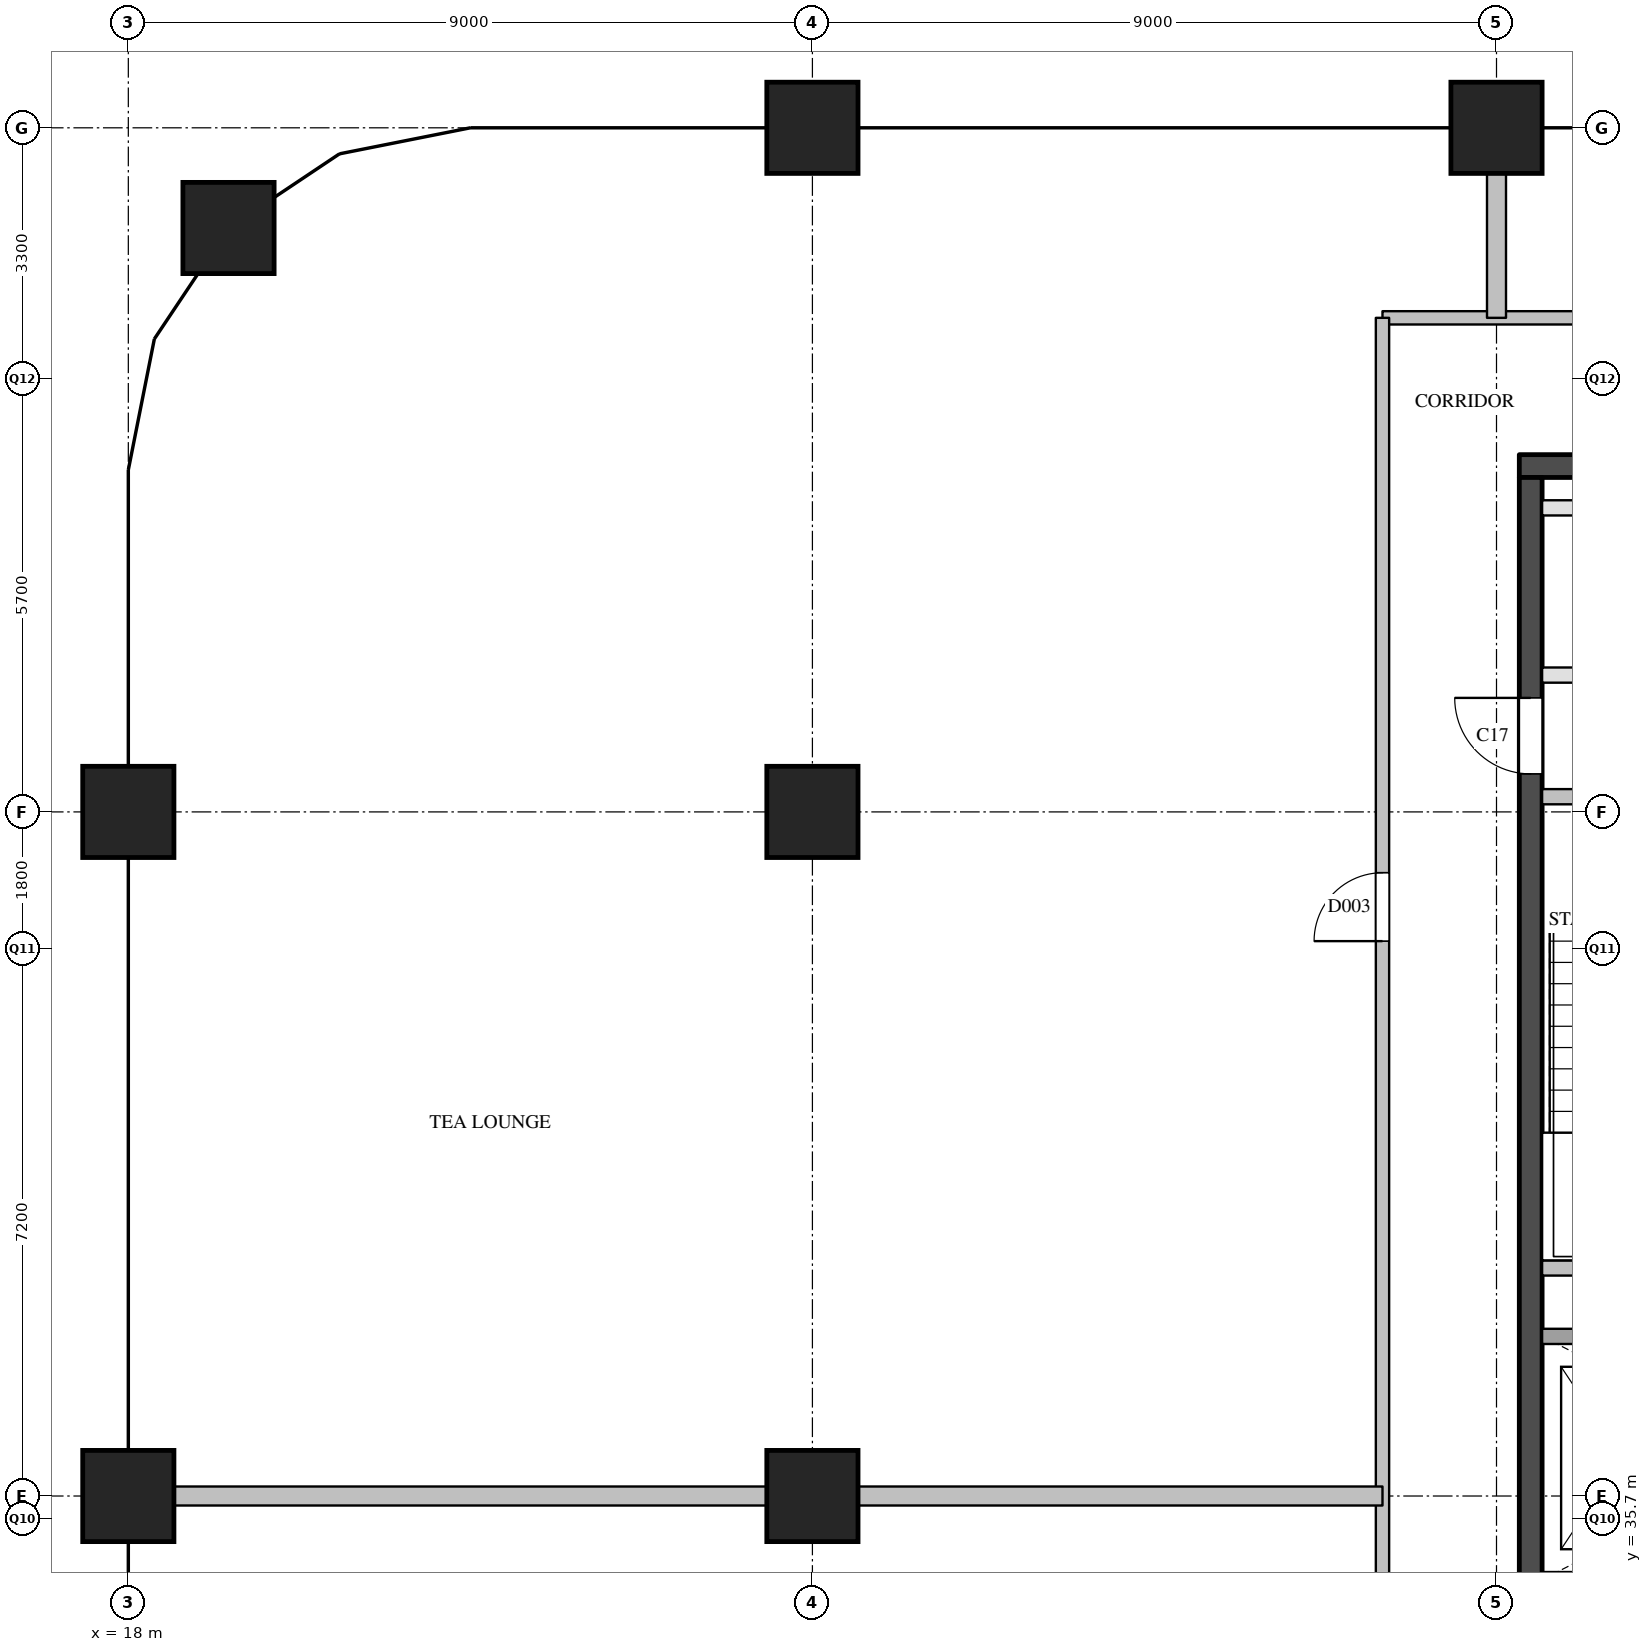
"""IFC4 building model, lengths in metres.
Left out: names, types, materials, properties, quantities, classifications, styles, units other than length and angle.
Written with IfcOpenShell. Run it as: python <this file> out.ifc"""

import sys

from ifc_helpers import new_model, si_unit, direction, frame, frame_2d, origin, origin_2d, place, context, subcontext, project, spatial, rectangle, extrude, element, fill, save


model = new_model("IFC4")
c1 = context("Model", 3, precision=1e-05, world=origin(), true_north=direction((0.0, 1.0)))
c2 = subcontext(c1, "Body", "Model", "MODEL_VIEW")
j1 = project(units=[si_unit("LENGTHUNIT", "METRE"), si_unit("PLANEANGLEUNIT", "RADIAN")], contexts=[c1])
p1 = place(None, origin())
s1 = spatial("IfcSite", under=j1, at=p1, CompositionType="ELEMENT")
p2 = place(p1, origin())
s2 = spatial("IfcBuilding", under=s1, at=p2, CompositionType="ELEMENT")
p3 = place(p2, frame((0.0, 0.0, 305.1)))
s3 = spatial("IfcBuildingStorey", under=s2, at=p3, CompositionType="ELEMENT", Elevation=305.1)
for number, where, z_axis, x_axis in (
    (1, (18.0, 36.0, 0.0), (0.0, 0.0, 1.0), (1.0, 0.0, 0.0)),
    (2, (18.0, 45.0, 0.0), (0.0, 0.0, 1.0), (1.0, 0.0, 0.0)),
    (3, (19.318, 52.682, 0.0), (0.0, 0.0, 1.0), (1.0, 0.0, 0.0)),
    (4, (27.0, 36.0, 0.0), (0.0, 0.0, 1.0), (1.0, 0.0, 0.0)),
    (5, (27.0, 45.0, 0.0), (0.0, 0.0, 1.0), (1.0, 0.0, 0.0)),
    (6, (27.0, 54.0, 0.0), (0.0, 0.0, 1.0), (1.0, 0.0, 0.0)),
    (7, (36.0, 54.0, 0.0), (0.0, 0.0, 1.0), (1.0, 0.0, 0.0)),
):
    element("IfcColumn", number, at=place(p3, frame(where, z_axis=z_axis, x_axis=x_axis)), inside=s3, PredefinedType="COLUMN", context=c2, shape_type="SweptSolid", body=[
        extrude(rectangle(XDim=1.2, YDim=1.2, at=origin_2d()), origin(), (0.0, 0.0, 1.0), 3.9),
    ])
p4 = place(p3, frame((36.3, 49.55, 0.0), z_axis=(0.0, 0.0, 1.0), x_axis=(1.0, 0.0, 0.0)))
e8 = element("IfcWall", 8, at=p4, inside=s3, PredefinedType="SHEAR", context=c2, shape_type="SweptSolid", body=[
    extrude(rectangle(XDim=11.8, YDim=0.3, at=frame_2d((5.9, 0.0))), origin(), (0.0, 0.0, 1.0), 3.6),
])
p5 = place(p3, frame((36.45, 29.1, 0.0), z_axis=(0.0, 0.0, 1.0), x_axis=(0.0, 1.0, 0.0)))
e9 = element("IfcWall", 9, at=p5, inside=s3, PredefinedType="SHEAR", context=c2, shape_type="SweptSolid", body=[
    extrude(rectangle(XDim=20.3, YDim=0.3, at=frame_2d((10.15, 0.0))), origin(), (0.0, 0.0, 1.0), 3.6),
])
p6 = place(p5, frame((3.6, 0.0, 0.0)))
e10 = element("IfcOpeningElement", 10, at=p6, cuts=e9, PredefinedType="OPENING", context=c2, shape_type="SweptSolid", body=[
    extrude(rectangle(XDim=1.8, YDim=2.1, at=frame_2d((0.9, 1.05))), frame((0.0, 0.16, 0.0), z_axis=(0.0, -1.0, 0.0), x_axis=(1.0, 0.0, 0.0)), (0.0, 0.0, 1.0), 0.32),
])
p7 = place(p5, frame((16.4, 0.0, 0.0)))
e11 = element("IfcOpeningElement", 11, at=p7, cuts=e9, PredefinedType="OPENING", context=c2, shape_type="SweptSolid", body=[
    extrude(rectangle(XDim=1.0, YDim=2.1, at=frame_2d((0.5, 1.05))), frame((0.0, 0.16, 0.0), z_axis=(0.0, -1.0, 0.0), x_axis=(1.0, 0.0, 0.0)), (0.0, 0.0, 1.0), 0.32),
])
p8 = place(p3, frame((36.6, 38.1, 0.0), z_axis=(0.0, 0.0, 1.0), x_axis=(1.0, 0.0, 0.0)))
e12 = element("IfcWall", 12, at=p8, inside=s3, PredefinedType="SOLIDWALL", context=c2, shape_type="SweptSolid", body=[
    extrude(rectangle(XDim=6.7, YDim=0.2, at=frame_2d((3.35, 0.0))), origin(), (0.0, 0.0, 1.0), 3.6),
])
p9 = place(p8, frame((0.45, 0.0, 0.0)))
e13 = element("IfcOpeningElement", 13, at=p9, cuts=e12, PredefinedType="OPENING", context=c2, shape_type="SweptSolid", body=[
    extrude(rectangle(XDim=1.2, YDim=2.1, at=frame_2d((0.6, 1.05))), frame((0.0, 0.11, 0.0), z_axis=(0.0, -1.0, 0.0), x_axis=(1.0, 0.0, 0.0)), (0.0, 0.0, 1.0), 0.22),
])
p10 = place(p8, frame((2.55, 0.0, 0.0)))
e14 = element("IfcOpeningElement", 14, at=p10, cuts=e12, PredefinedType="OPENING", context=c2, shape_type="SweptSolid", body=[
    extrude(rectangle(XDim=1.2, YDim=2.1, at=frame_2d((0.6, 1.05))), frame((0.0, 0.11, 0.0), z_axis=(0.0, -1.0, 0.0), x_axis=(1.0, 0.0, 0.0)), (0.0, 0.0, 1.0), 0.22),
])
p11 = place(p8, frame((4.65, 0.0, 0.0)))
e15 = element("IfcOpeningElement", 15, at=p11, cuts=e12, PredefinedType="OPENING", context=c2, shape_type="SweptSolid", body=[
    extrude(rectangle(XDim=1.2, YDim=2.1, at=frame_2d((0.6, 1.05))), frame((0.0, 0.11, 0.0), z_axis=(0.0, -1.0, 0.0), x_axis=(1.0, 0.0, 0.0)), (0.0, 0.0, 1.0), 0.22),
])
p12 = place(p3, frame((36.6, 39.0, 0.0), z_axis=(0.0, 0.0, 1.0), x_axis=(1.0, 0.0, 0.0)))
e16 = element("IfcWall", 16, at=p12, inside=s3, PredefinedType="SOLIDWALL", context=c2, shape_type="SweptSolid", body=[
    extrude(rectangle(XDim=3.25, YDim=0.2, at=frame_2d((1.625, 0.0))), origin(), (0.0, 0.0, 1.0), 3.6),
])
p13 = place(p3, frame((36.6, 45.2, 0.0), z_axis=(0.0, 0.0, 1.0), x_axis=(1.0, 0.0, 0.0)))
e17 = element("IfcWall", 17, at=p13, inside=s3, PredefinedType="SOLIDWALL", context=c2, shape_type="SweptSolid", body=[
    extrude(rectangle(XDim=10.05, YDim=0.2, at=frame_2d((5.025, 0.0))), origin(), (0.0, 0.0, 1.0), 3.6),
])
p14 = place(p13, frame((1.125, 0.0, 0.0)))
e18 = element("IfcOpeningElement", 18, at=p14, cuts=e17, PredefinedType="OPENING", context=c2, shape_type="SweptSolid", body=[
    extrude(rectangle(XDim=1.1, YDim=2.1, at=frame_2d((0.55, 1.05))), frame((0.0, 0.11, 0.0), z_axis=(0.0, -1.0, 0.0), x_axis=(1.0, 0.0, 0.0)), (0.0, 0.0, 1.0), 0.22),
])
p15 = place(p13, frame((4.475, 0.0, 0.0)))
e19 = element("IfcOpeningElement", 19, at=p15, cuts=e17, PredefinedType="OPENING", context=c2, shape_type="SweptSolid", body=[
    extrude(rectangle(XDim=1.1, YDim=2.1, at=frame_2d((0.55, 1.05))), frame((0.0, 0.11, 0.0), z_axis=(0.0, -1.0, 0.0), x_axis=(1.0, 0.0, 0.0)), (0.0, 0.0, 1.0), 0.22),
])
p16 = place(p13, frame((7.825, 0.0, 0.0)))
e20 = element("IfcOpeningElement", 20, at=p16, cuts=e17, PredefinedType="OPENING", context=c2, shape_type="SweptSolid", body=[
    extrude(rectangle(XDim=1.1, YDim=2.1, at=frame_2d((0.55, 1.05))), frame((0.0, 0.11, 0.0), z_axis=(0.0, -1.0, 0.0), x_axis=(1.0, 0.0, 0.0)), (0.0, 0.0, 1.0), 0.22),
])
p17 = place(p3, frame((36.6, 46.8, 0.0), z_axis=(0.0, 0.0, 1.0), x_axis=(1.0, 0.0, 0.0)))
e21 = element("IfcWall", 21, at=p17, inside=s3, PredefinedType="PARTITIONING", context=c2, shape_type="SweptSolid", body=[
    extrude(rectangle(XDim=11.2, YDim=0.2, at=frame_2d((5.6, 0.0))), origin(), (0.0, 0.0, 1.0), 3.6),
])
p18 = place(p17, frame((5.15, 0.0, 0.0)))
e22 = element("IfcOpeningElement", 22, at=p18, cuts=e21, PredefinedType="OPENING", context=c2, shape_type="SweptSolid", body=[
    extrude(rectangle(XDim=0.9, YDim=2.1, at=frame_2d((0.45, 1.05))), frame((0.0, 0.11, 0.0), z_axis=(0.0, -1.0, 0.0), x_axis=(1.0, 0.0, 0.0)), (0.0, 0.0, 1.0), 0.22),
])
p19 = place(p3, frame((36.6, 49.0, 0.0), z_axis=(0.0, 0.0, 1.0), x_axis=(1.0, 0.0, 0.0)))
e23 = element("IfcWall", 23, at=p19, inside=s3, PredefinedType="PARTITIONING", context=c2, shape_type="SweptSolid", body=[
    extrude(rectangle(XDim=11.2, YDim=0.2, at=frame_2d((5.6, 0.0))), origin(), (0.0, 0.0, 1.0), 3.6),
])
p20 = place(p3, frame((34.5, 51.5, 0.0), z_axis=(0.0, 0.0, 1.0), x_axis=(1.0, 0.0, 0.0)))
e24 = element("IfcWall", 24, at=p20, inside=s3, PredefinedType="PARTITIONING", context=c2, shape_type="SweptSolid", body=[
    extrude(rectangle(XDim=15.4, YDim=0.175, at=frame_2d((7.7, 0.0))), origin(), (0.0, 0.0, 1.0), 3.6),
])
p21 = place(p20, frame((4.6, 0.0, 0.0)))
e25 = element("IfcOpeningElement", 25, at=p21, cuts=e24, PredefinedType="OPENING", context=c2, shape_type="SweptSolid", body=[
    extrude(rectangle(XDim=1.0, YDim=2.1, at=frame_2d((0.5, 1.05))), frame((0.0, 0.097, 0.0), z_axis=(0.0, -1.0, 0.0), x_axis=(1.0, 0.0, 0.0)), (0.0, 0.0, 1.0), 0.195),
])
p22 = place(p3, frame((34.5, 28.5, 0.0), z_axis=(0.0, 0.0, 1.0), x_axis=(0.0, 1.0, 0.0)))
e26 = element("IfcWall", 26, at=p22, inside=s3, PredefinedType="PARTITIONING", context=c2, shape_type="SweptSolid", body=[
    extrude(rectangle(XDim=23.0, YDim=0.175, at=frame_2d((11.5, 0.0))), origin(), (0.0, 0.0, 1.0), 3.6),
])
p23 = place(p22, frame((3.3, 0.0, 0.0)))
e27 = element("IfcOpeningElement", 27, at=p23, cuts=e26, PredefinedType="OPENING", context=c2, shape_type="SweptSolid", body=[
    extrude(rectangle(XDim=0.9, YDim=2.1, at=frame_2d((0.45, 1.05))), frame((0.0, 0.097, 0.0), z_axis=(0.0, -1.0, 0.0), x_axis=(1.0, 0.0, 0.0)), (0.0, 0.0, 1.0), 0.195),
])
p24 = place(p22, frame((14.8, 0.0, 0.0)))
e28 = element("IfcOpeningElement", 28, at=p24, cuts=e26, PredefinedType="OPENING", context=c2, shape_type="SweptSolid", body=[
    extrude(rectangle(XDim=0.9, YDim=2.1, at=frame_2d((0.45, 1.05))), frame((0.0, 0.097, 0.0), z_axis=(0.0, -1.0, 0.0), x_axis=(1.0, 0.0, 0.0)), (0.0, 0.0, 1.0), 0.195),
])
p25 = place(p3, frame((18.0, 36.0, 0.0), z_axis=(0.0, 0.0, 1.0), x_axis=(1.0, 0.0, 0.0)))
e29 = element("IfcWall", 29, at=p25, inside=s3, PredefinedType="PARTITIONING", context=c2, shape_type="SweptSolid", body=[
    extrude(rectangle(XDim=16.5, YDim=0.25, at=frame_2d((8.25, 0.0))), origin(), (0.0, 0.0, 1.0), 3.6),
])
p26 = place(p3, frame((36.0, 51.5, 0.0), z_axis=(0.0, 0.0, 1.0), x_axis=(0.0, 1.0, 0.0)))
e30 = element("IfcWall", 30, at=p26, inside=s3, PredefinedType="PARTITIONING", context=c2, shape_type="SweptSolid", body=[
    extrude(rectangle(XDim=2.5, YDim=0.25, at=frame_2d((1.25, 0.0))), origin(), (0.0, 0.0, 1.0), 3.6),
])
p27 = place(p7, origin())
e31 = element("IfcDoor", 31, at=p27, inside=s3, OperationType="SINGLE_SWING_RIGHT", PredefinedType="DOOR", context=c2, shape_type="SweptSolid", body=[
    extrude(rectangle(XDim=1.0, YDim=2.1, at=frame_2d((0.5, 1.05))), frame((0.0, 0.025, 0.0), z_axis=(0.0, -1.0, 0.0), x_axis=(1.0, 0.0, 0.0)), (0.0, 0.0, 1.0), 0.05),
])
fill(e11, e31)
p28 = place(p24, origin())
e32 = element("IfcDoor", 32, at=p28, inside=s3, OperationType="SINGLE_SWING_LEFT", PredefinedType="DOOR", context=c2, shape_type="SweptSolid", body=[
    extrude(rectangle(XDim=0.9, YDim=2.1, at=frame_2d((0.45, 1.05))), frame((0.0, 0.025, 0.0), z_axis=(0.0, -1.0, 0.0), x_axis=(1.0, 0.0, 0.0)), (0.0, 0.0, 1.0), 0.05),
])
fill(e28, e32)
save(model, sys.argv[1])
